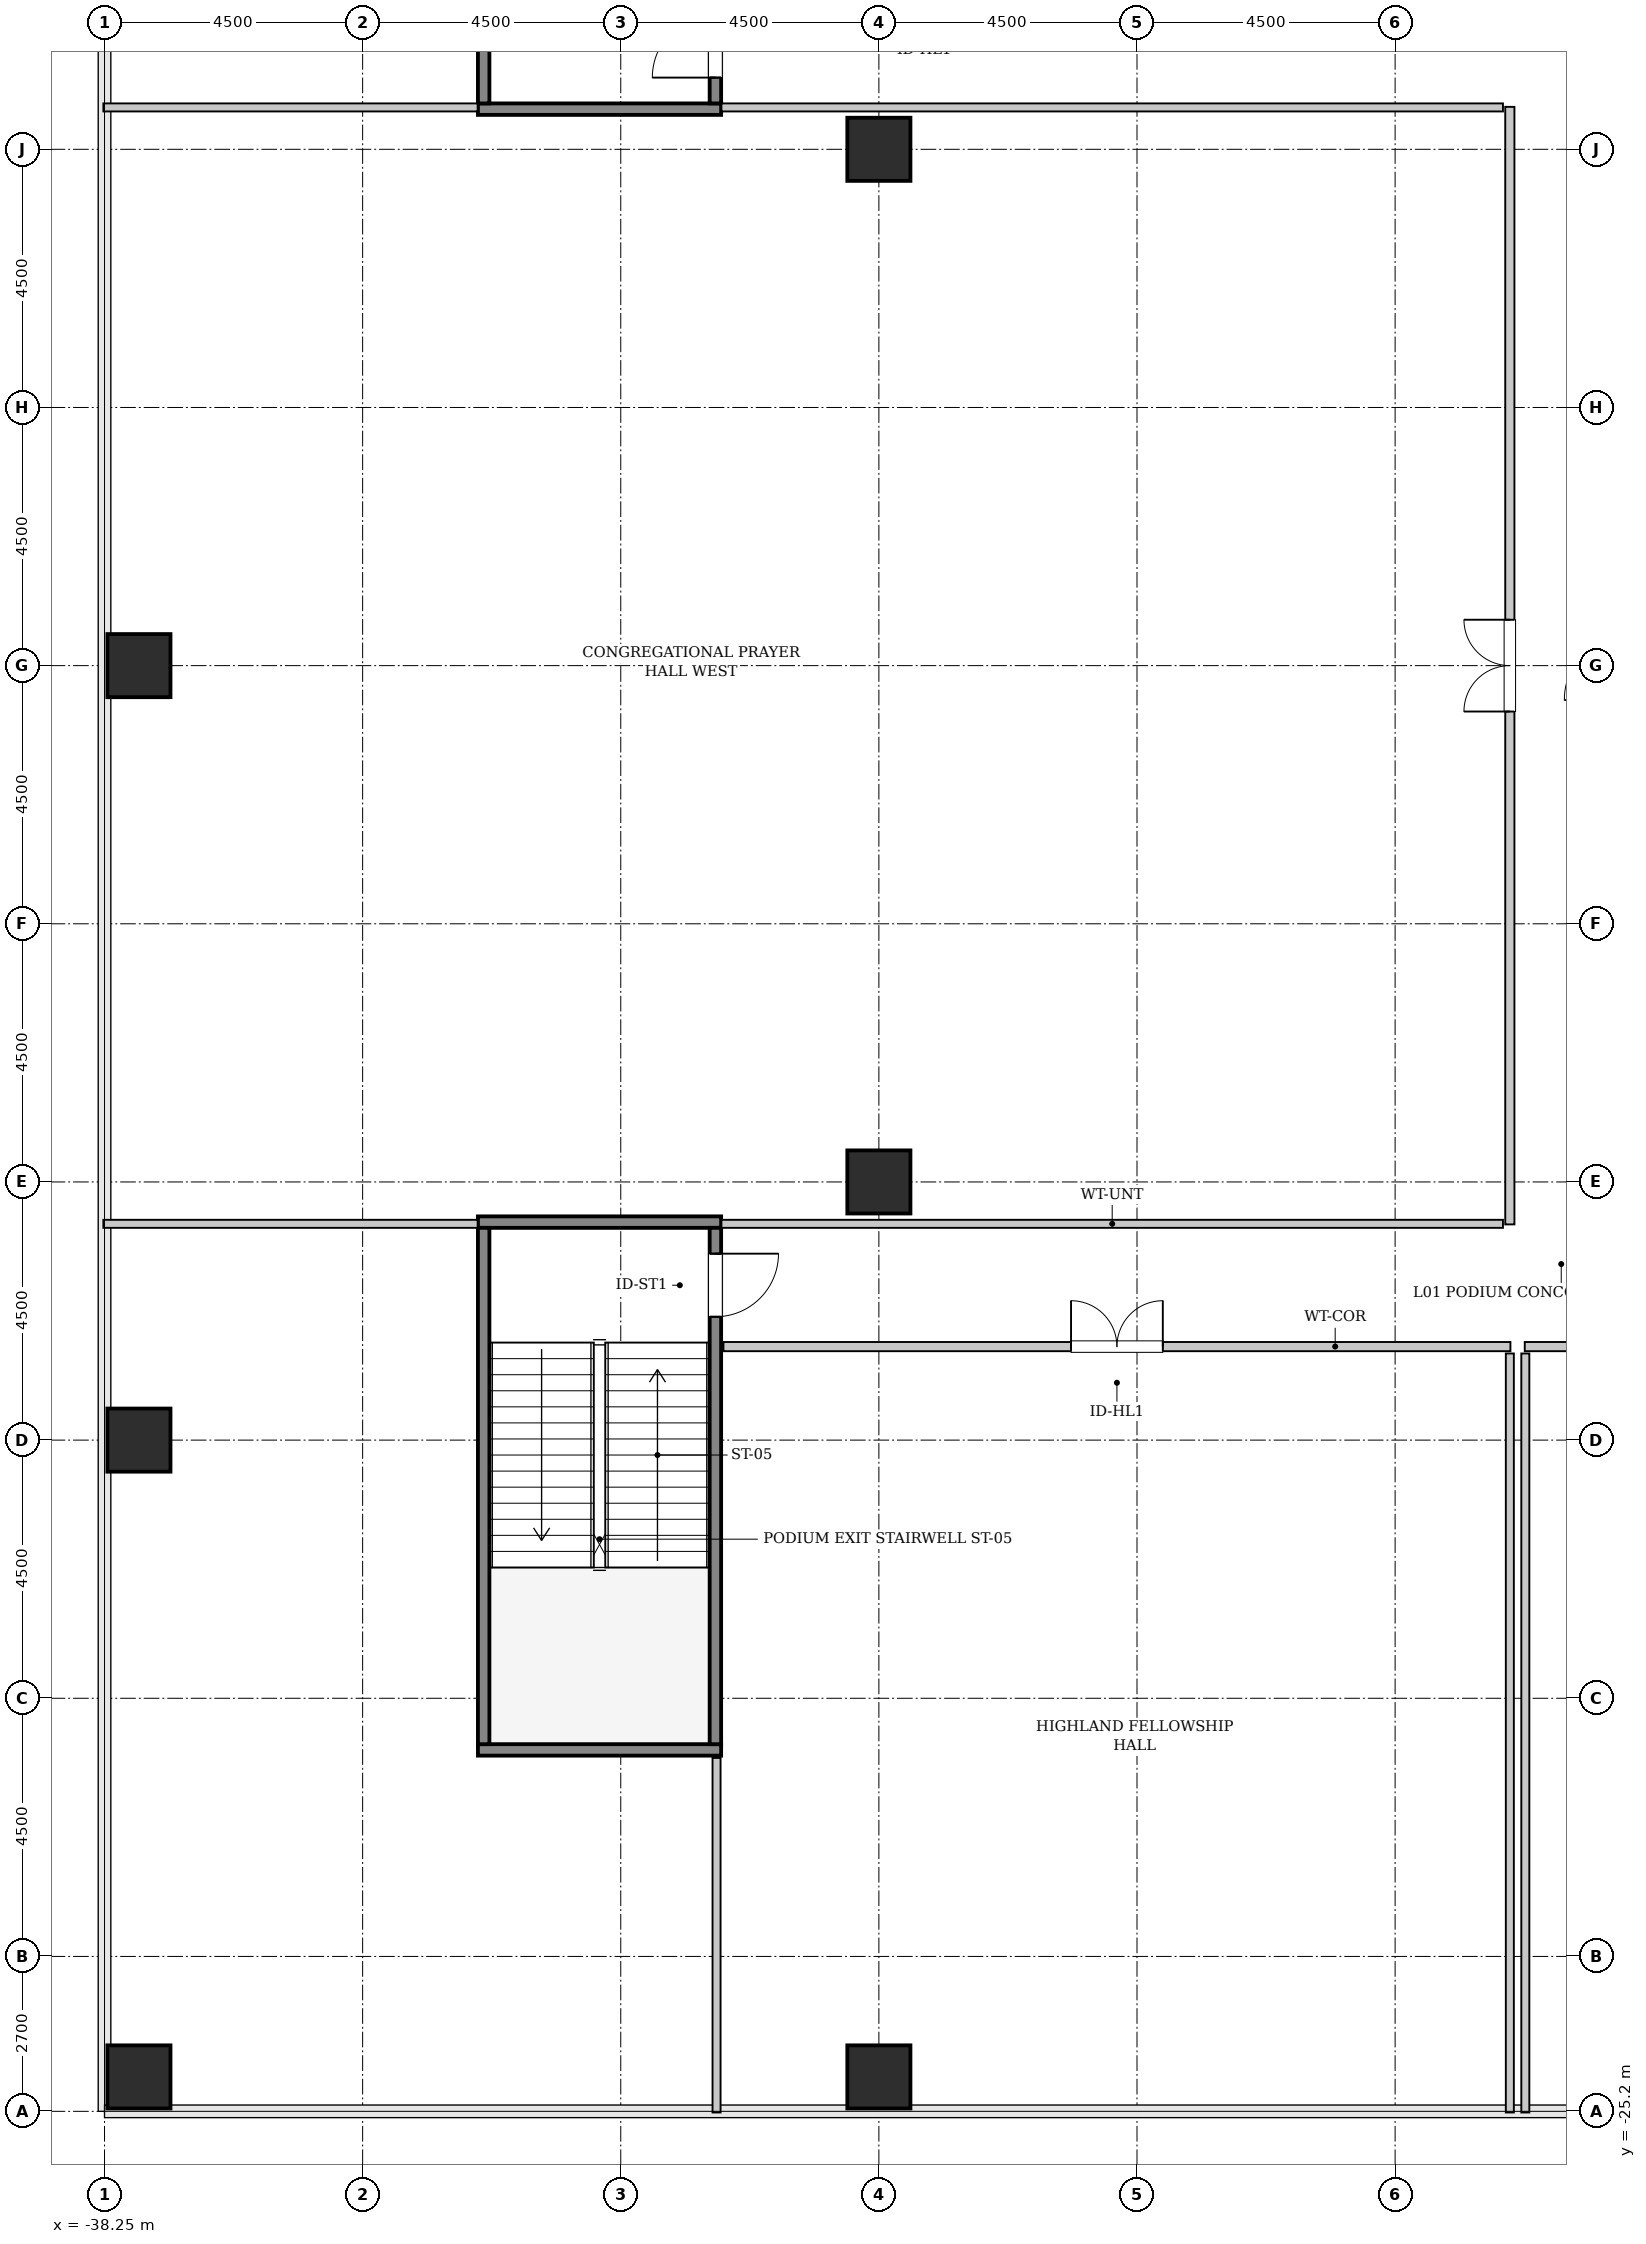
"""IFC4 building model, lengths in metres.
Left out: names, types, materials, properties, quantities, classifications, styles, units other than length and angle.
Written with IfcOpenShell. Run it as: python <this file> out.ifc"""

import sys

from ifc_helpers import new_model, si_unit, direction, frame, frame_2d, origin, origin_2d, place, context, subcontext, project, spatial, rectangle, hollow_rectangle, extrude, source, transform, mapped, element, fill, save


model = new_model("IFC4")
c1 = context("Model", 3, precision=1e-05, world=origin(), true_north=direction((0.0, 1.0)))
c2 = subcontext(c1, "Body", "Model", "MODEL_VIEW")
j1 = project(units=[si_unit("LENGTHUNIT", "METRE"), si_unit("PLANEANGLEUNIT", "RADIAN")], contexts=[c1])
p1 = place(None, origin())
s1 = spatial("IfcSite", under=j1, at=p1, CompositionType="ELEMENT")
p2 = place(p1, origin())
s2 = spatial("IfcBuilding", under=s1, at=p2, CompositionType="ELEMENT")
p3 = place(p2, frame((0.0, 0.0, 6.0)))
s3 = spatial("IfcBuildingStorey", under=s2, at=p3, CompositionType="ELEMENT", Elevation=6.0)
m1 = source(origin(), c2, "Body", "SweptSolid", [
    extrude(hollow_rectangle(XDim=1.1, YDim=1.1, WallThickness=0.055, InnerFilletRadius=0.055, OuterFilletRadius=0.11, at=origin_2d()), origin(), (0.0, 0.0, 1.0), 5.4),
])
for number, where, z_axis, x_axis in (
    (1, (-37.65, -24.6, 0.0), (0.0, 0.0, 1.0), (1.0, 0.0, 0.0)),
    (2, (-37.65, -13.5, 0.0), (0.0, 0.0, 1.0), (1.0, 0.0, 0.0)),
    (3, (-37.65, 0.0, 0.0), (0.0, 0.0, 1.0), (1.0, 0.0, 0.0)),
    (4, (-24.75, -24.6, 0.0), (0.0, 0.0, 1.0), (1.0, 0.0, 0.0)),
):
    element("IfcColumn", number, at=place(p3, frame(where, z_axis=z_axis, x_axis=x_axis)), inside=s3, PredefinedType="COLUMN", context=c2, shape_type="MappedRepresentation", body=[
        mapped(m1, transform((0.0, 0.0, 0.0), x_axis=(1.0, 0.0, 0.0), y_axis=(0.0, 1.0, 0.0), z_axis=(0.0, 0.0, 1.0), scale=1.0)),
    ])
m2 = source(origin(), c2, "Body", "SweptSolid", [
    extrude(hollow_rectangle(XDim=1.1, YDim=1.1, WallThickness=0.055, InnerFilletRadius=0.055, OuterFilletRadius=0.11, at=origin_2d()), origin(), (0.0, 0.0, 1.0), 5.4),
])
for number, where, z_axis, x_axis in (
    (5, (-24.75, -9.0, 0.0), (0.0, 0.0, 1.0), (1.0, 0.0, 0.0)),
    (6, (-24.75, 9.0, 0.0), (0.0, 0.0, 1.0), (1.0, 0.0, 0.0)),
):
    element("IfcColumn", number, at=place(p3, frame(where, z_axis=z_axis, x_axis=x_axis)), inside=s3, PredefinedType="COLUMN", context=c2, shape_type="MappedRepresentation", body=[
        mapped(m2, transform((0.0, 0.0, 0.0), x_axis=(1.0, 0.0, 0.0), y_axis=(0.0, 1.0, 0.0), z_axis=(0.0, 0.0, 1.0), scale=1.0)),
    ])
m3 = source(origin(), c2, "Body", "SweptSolid", [
    extrude(rectangle(XDim=4.24, YDim=0.2, at=frame_2d((2.12, 0.0))), origin(), (0.0, 0.0, 1.0), 5.4),
])
p4 = place(p3, frame((-27.5, 9.7, 0.0), z_axis=(0.0, 0.0, 1.0), x_axis=(-1.0, 0.0, 0.0)))
e7 = element("IfcWall", 7, at=p4, inside=s3, PredefinedType="SOLIDWALL", context=c2, shape_type="MappedRepresentation", body=[
    mapped(m3, transform((0.0, 0.0, 0.0), x_axis=(1.0, 0.0, 0.0), y_axis=(0.0, 1.0, 0.0), z_axis=(0.0, 0.0, 1.0), scale=1.0)),
])
m4 = source(origin(), c2, "Body", "SweptSolid", [
    extrude(rectangle(XDim=9.0, YDim=0.2, at=frame_2d((4.5, 0.0))), origin(), (0.0, 0.0, 1.0), 5.4),
])
p5 = place(p3, frame((-27.6, 9.8, 0.0), z_axis=(0.0, 0.0, 1.0), x_axis=(0.0, 1.0, 0.0)))
e8 = element("IfcWall", 8, at=p5, inside=s3, PredefinedType="SOLIDWALL", context=c2, shape_type="MappedRepresentation", body=[
    mapped(m4, transform((0.0, 0.0, 0.0), x_axis=(1.0, 0.0, 0.0), y_axis=(0.0, 1.0, 0.0), z_axis=(0.0, 0.0, 1.0), scale=1.0)),
])
p6 = place(p5, frame((0.45, 0.0, 0.0)))
e9 = element("IfcOpeningElement", 9, at=p6, cuts=e8, PredefinedType="OPENING", context=c2, shape_type="SweptSolid", body=[
    extrude(rectangle(XDim=1.1, YDim=2.15, at=frame_2d((0.55, 1.075))), frame((0.0, 0.11, 0.0), z_axis=(0.0, -1.0, 0.0), x_axis=(1.0, 0.0, 0.0)), (0.0, 0.0, 1.0), 0.22),
])
p7 = place(p3, frame((-31.64, 9.8, 0.0), z_axis=(0.0, 0.0, 1.0), x_axis=(0.0, 1.0, 0.0)))
e10 = element("IfcWall", 10, at=p7, inside=s3, PredefinedType="SOLIDWALL", context=c2, shape_type="MappedRepresentation", body=[
    mapped(m4, transform((0.0, 0.0, 0.0), x_axis=(1.0, 0.0, 0.0), y_axis=(0.0, 1.0, 0.0), z_axis=(0.0, 0.0, 1.0), scale=1.0)),
])
for number, where, z_axis, x_axis in (
    (11, (-31.74, -9.7, 0.0), (0.0, 0.0, 1.0), (1.0, 0.0, 0.0)),
    (12, (-31.74, -18.9, 0.0), (0.0, 0.0, 1.0), (1.0, 0.0, 0.0)),
):
    element("IfcWall", number, at=place(p3, frame(where, z_axis=z_axis, x_axis=x_axis)), inside=s3, PredefinedType="SOLIDWALL", context=c2, shape_type="MappedRepresentation", body=[
        mapped(m3, transform((0.0, 0.0, 0.0), x_axis=(1.0, 0.0, 0.0), y_axis=(0.0, 1.0, 0.0), z_axis=(0.0, 0.0, 1.0), scale=1.0)),
    ])
p8 = place(p3, frame((-31.64, -9.8, 0.0), z_axis=(0.0, 0.0, 1.0), x_axis=(0.0, -1.0, 0.0)))
e13 = element("IfcWall", 13, at=p8, inside=s3, PredefinedType="SOLIDWALL", context=c2, shape_type="MappedRepresentation", body=[
    mapped(m4, transform((0.0, 0.0, 0.0), x_axis=(1.0, 0.0, 0.0), y_axis=(0.0, 1.0, 0.0), z_axis=(0.0, 0.0, 1.0), scale=1.0)),
])
p9 = place(p3, frame((-27.6, -9.8, 0.0), z_axis=(0.0, 0.0, 1.0), x_axis=(0.0, -1.0, 0.0)))
e14 = element("IfcWall", 14, at=p9, inside=s3, PredefinedType="SOLIDWALL", context=c2, shape_type="MappedRepresentation", body=[
    mapped(m4, transform((0.0, 0.0, 0.0), x_axis=(1.0, 0.0, 0.0), y_axis=(0.0, 1.0, 0.0), z_axis=(0.0, 0.0, 1.0), scale=1.0)),
])
p10 = place(p9, frame((0.45, 0.0, 0.0)))
e15 = element("IfcOpeningElement", 15, at=p10, cuts=e14, PredefinedType="OPENING", context=c2, shape_type="SweptSolid", body=[
    extrude(rectangle(XDim=1.1, YDim=2.15, at=frame_2d((0.55, 1.075))), frame((0.0, 0.11, 0.0), z_axis=(0.0, -1.0, 0.0), x_axis=(1.0, 0.0, 0.0)), (0.0, 0.0, 1.0), 0.22),
])
m5 = source(origin(), c2, "Body", "SweptSolid", [
    extrude(rectangle(XDim=19.48, YDim=0.16, at=frame_2d((9.74, 0.0))), origin(), (0.0, 0.0, 1.0), 5.085),
])
p11 = place(p3, frame((-13.75, -9.74, 0.0), z_axis=(0.0, 0.0, 1.0), x_axis=(0.0, 1.0, 0.0)))
e16 = element("IfcWall", 16, at=p11, inside=s3, PredefinedType="PARTITIONING", context=c2, shape_type="MappedRepresentation", body=[
    mapped(m5, transform((0.0, 0.0, 0.0), x_axis=(1.0, 0.0, 0.0), y_axis=(0.0, 1.0, 0.0), z_axis=(0.0, 0.0, 1.0), scale=1.0)),
])
p12 = place(p11, frame((8.94, 0.0, 0.0)))
e17 = element("IfcOpeningElement", 17, at=p12, cuts=e16, PredefinedType="OPENING", context=c2, shape_type="SweptSolid", body=[
    extrude(rectangle(XDim=1.6, YDim=2.3, at=frame_2d((0.8, 1.15))), frame((0.0, 0.09, 0.0), z_axis=(0.0, -1.0, 0.0), x_axis=(1.0, 0.0, 0.0)), (0.0, 0.0, 1.0), 0.18),
])
m6 = source(origin(), c2, "Body", "SweptSolid", [
    extrude(rectangle(XDim=6.525, YDim=0.14, at=frame_2d((3.262, 0.0))), origin(), (0.0, 0.0, 1.0), 5.085),
])
p13 = place(p3, frame((-38.27, -9.73, 0.0), z_axis=(0.0, 0.0, 1.0), x_axis=(1.0, 0.0, 0.0)))
e18 = element("IfcWall", 18, at=p13, inside=s3, PredefinedType="PARTITIONING", context=c2, shape_type="MappedRepresentation", body=[
    mapped(m6, transform((0.0, 0.0, 0.0), x_axis=(1.0, 0.0, 0.0), y_axis=(0.0, 1.0, 0.0), z_axis=(0.0, 0.0, 1.0), scale=1.0)),
])
m7 = source(origin(), c2, "Body", "SweptSolid", [
    extrude(rectangle(XDim=13.625, YDim=0.14, at=frame_2d((6.812, 0.0))), origin(), (0.0, 0.0, 1.0), 5.085),
])
for number, where, z_axis, x_axis in (
    (19, (-27.495, -9.73, 0.0), (0.0, 0.0, 1.0), (1.0, 0.0, 0.0)),
    (20, (-27.495, 9.73, 0.0), (0.0, 0.0, 1.0), (1.0, 0.0, 0.0)),
):
    element("IfcWall", number, at=place(p3, frame(where, z_axis=z_axis, x_axis=x_axis)), inside=s3, PredefinedType="PARTITIONING", context=c2, shape_type="MappedRepresentation", body=[
        mapped(m7, transform((0.0, 0.0, 0.0), x_axis=(1.0, 0.0, 0.0), y_axis=(0.0, 1.0, 0.0), z_axis=(0.0, 0.0, 1.0), scale=1.0)),
    ])
p14 = place(p3, frame((-38.27, 9.73, 0.0), z_axis=(0.0, 0.0, 1.0), x_axis=(1.0, 0.0, 0.0)))
e21 = element("IfcWall", 21, at=p14, inside=s3, PredefinedType="PARTITIONING", context=c2, shape_type="MappedRepresentation", body=[
    mapped(m6, transform((0.0, 0.0, 0.0), x_axis=(1.0, 0.0, 0.0), y_axis=(0.0, 1.0, 0.0), z_axis=(0.0, 0.0, 1.0), scale=1.0)),
])
m8 = source(origin(), c2, "Body", "SweptSolid", [
    extrude(rectangle(XDim=13.72, YDim=0.16, at=frame_2d((6.86, 0.0))), origin(), (0.0, 0.0, 1.0), 5.085),
])
p15 = place(p3, frame((-27.46, -11.87, 0.0), z_axis=(0.0, 0.0, 1.0), x_axis=(1.0, 0.0, 0.0)))
e22 = element("IfcWall", 22, at=p15, inside=s3, PredefinedType="PARTITIONING", context=c2, shape_type="MappedRepresentation", body=[
    mapped(m8, transform((0.0, 0.0, 0.0), x_axis=(1.0, 0.0, 0.0), y_axis=(0.0, 1.0, 0.0), z_axis=(0.0, 0.0, 1.0), scale=1.0)),
])
p16 = place(p15, frame((6.06, 0.0, 0.0)))
e23 = element("IfcOpeningElement", 23, at=p16, cuts=e22, PredefinedType="OPENING", context=c2, shape_type="SweptSolid", body=[
    extrude(rectangle(XDim=1.6, YDim=2.3, at=frame_2d((0.8, 1.15))), frame((0.0, 0.09, 0.0), z_axis=(0.0, -1.0, 0.0), x_axis=(1.0, 0.0, 0.0)), (0.0, 0.0, 1.0), 0.18),
])
m9 = source(origin(), c2, "Body", "SweptSolid", [
    extrude(rectangle(XDim=13.23, YDim=0.14, at=frame_2d((6.615, 0.0))), origin(), (0.0, 0.0, 1.0), 5.085),
])
p17 = place(p3, frame((-13.75, -25.22, 0.0), z_axis=(0.0, 0.0, 1.0), x_axis=(0.0, 1.0, 0.0)))
e24 = element("IfcWall", 24, at=p17, inside=s3, PredefinedType="PARTITIONING", context=c2, shape_type="MappedRepresentation", body=[
    mapped(m9, transform((0.0, 0.0, 0.0), x_axis=(1.0, 0.0, 0.0), y_axis=(0.0, 1.0, 0.0), z_axis=(0.0, 0.0, 1.0), scale=1.0)),
])
m10 = source(origin(), c2, "Body", "SweptSolid", [
    extrude(rectangle(XDim=6.18, YDim=0.14, at=frame_2d((3.09, 0.0))), origin(), (0.0, 0.0, 1.0), 5.085),
])
p18 = place(p3, frame((-27.58, -25.22, 0.0), z_axis=(0.0, 0.0, 1.0), x_axis=(0.0, 1.0, 0.0)))
e25 = element("IfcWall", 25, at=p18, inside=s3, PredefinedType="PARTITIONING", context=c2, shape_type="MappedRepresentation", body=[
    mapped(m10, transform((0.0, 0.0, 0.0), x_axis=(1.0, 0.0, 0.0), y_axis=(0.0, 1.0, 0.0), z_axis=(0.0, 0.0, 1.0), scale=1.0)),
])
m11 = source(origin(), c2, "Body", "SweptSolid", [
    extrude(rectangle(XDim=31.95, YDim=0.16, at=frame_2d((15.975, 0.0))), origin(), (0.0, 0.0, 1.0), 5.085),
])
p19 = place(p3, frame((-13.49, -11.87, 0.0), z_axis=(0.0, 0.0, 1.0), x_axis=(1.0, 0.0, 0.0)))
e26 = element("IfcWall", 26, at=p19, inside=s3, PredefinedType="PARTITIONING", context=c2, shape_type="MappedRepresentation", body=[
    mapped(m11, transform((0.0, 0.0, 0.0), x_axis=(1.0, 0.0, 0.0), y_axis=(0.0, 1.0, 0.0), z_axis=(0.0, 0.0, 1.0), scale=1.0)),
])
p20 = place(p19, frame((28.533, 0.0, 0.0)))
e27 = element("IfcOpeningElement", 27, at=p20, cuts=e26, PredefinedType="OPENING", context=c2, shape_type="SweptSolid", body=[
    extrude(rectangle(XDim=1.6, YDim=2.3, at=frame_2d((0.8, 1.15))), frame((0.0, 0.09, 0.0), z_axis=(0.0, -1.0, 0.0), x_axis=(1.0, 0.0, 0.0)), (0.0, 0.0, 1.0), 0.18),
])
p21 = place(p3, frame((-13.48, -25.22, 0.0), z_axis=(0.0, 0.0, 1.0), x_axis=(0.0, 1.0, 0.0)))
e28 = element("IfcWall", 28, at=p21, inside=s3, PredefinedType="PARTITIONING", context=c2, shape_type="MappedRepresentation", body=[
    mapped(m9, transform((0.0, 0.0, 0.0), x_axis=(1.0, 0.0, 0.0), y_axis=(0.0, 1.0, 0.0), z_axis=(0.0, 0.0, 1.0), scale=1.0)),
])
m12 = source(origin(), c2, "Body", "SweptSolid", [
    extrude(rectangle(XDim=1.1, YDim=2.15, at=frame_2d((0.55, 1.075))), frame((0.0, 0.025, 0.0), z_axis=(0.0, -1.0, 0.0), x_axis=(1.0, 0.0, 0.0)), (0.0, 0.0, 1.0), 0.05),
])
p22 = place(p6, origin())
e29 = element("IfcDoor", 29, at=p22, inside=s3, OperationType="SINGLE_SWING_LEFT", PredefinedType="DOOR", context=c2, shape_type="MappedRepresentation", body=[
    mapped(m12, transform((0.0, 0.0, 0.0), x_axis=(1.0, 0.0, 0.0), y_axis=(0.0, 1.0, 0.0), z_axis=(0.0, 0.0, 1.0), scale=1.0)),
])
fill(e9, e29)
p23 = place(p10, origin())
e30 = element("IfcDoor", 30, at=p23, inside=s3, OperationType="SINGLE_SWING_LEFT", PredefinedType="DOOR", context=c2, shape_type="MappedRepresentation", body=[
    mapped(m12, transform((0.0, 0.0, 0.0), x_axis=(1.0, 0.0, 0.0), y_axis=(0.0, 1.0, 0.0), z_axis=(0.0, 0.0, 1.0), scale=1.0)),
])
fill(e15, e30)
m13 = source(origin(), c2, "Body", "SweptSolid", [
    extrude(rectangle(XDim=1.6, YDim=2.3, at=frame_2d((0.8, 1.15))), frame((0.0, 0.025, 0.0), z_axis=(0.0, -1.0, 0.0), x_axis=(1.0, 0.0, 0.0)), (0.0, 0.0, 1.0), 0.05),
])
p24 = place(p12, origin())
e31 = element("IfcDoor", 31, at=p24, inside=s3, OperationType="DOUBLE_DOOR_SINGLE_SWING", PredefinedType="DOOR", context=c2, shape_type="MappedRepresentation", body=[
    mapped(m13, transform((0.0, 0.0, 0.0), x_axis=(1.0, 0.0, 0.0), y_axis=(0.0, 1.0, 0.0), z_axis=(0.0, 0.0, 1.0), scale=1.0)),
])
fill(e17, e31)
p25 = place(p16, origin())
e32 = element("IfcDoor", 32, at=p25, inside=s3, OperationType="DOUBLE_DOOR_SINGLE_SWING", PredefinedType="DOOR", context=c2, shape_type="MappedRepresentation", body=[
    mapped(m13, transform((0.0, 0.0, 0.0), x_axis=(1.0, 0.0, 0.0), y_axis=(0.0, 1.0, 0.0), z_axis=(0.0, 0.0, 1.0), scale=1.0)),
])
fill(e23, e32)
save(model, sys.argv[1])
